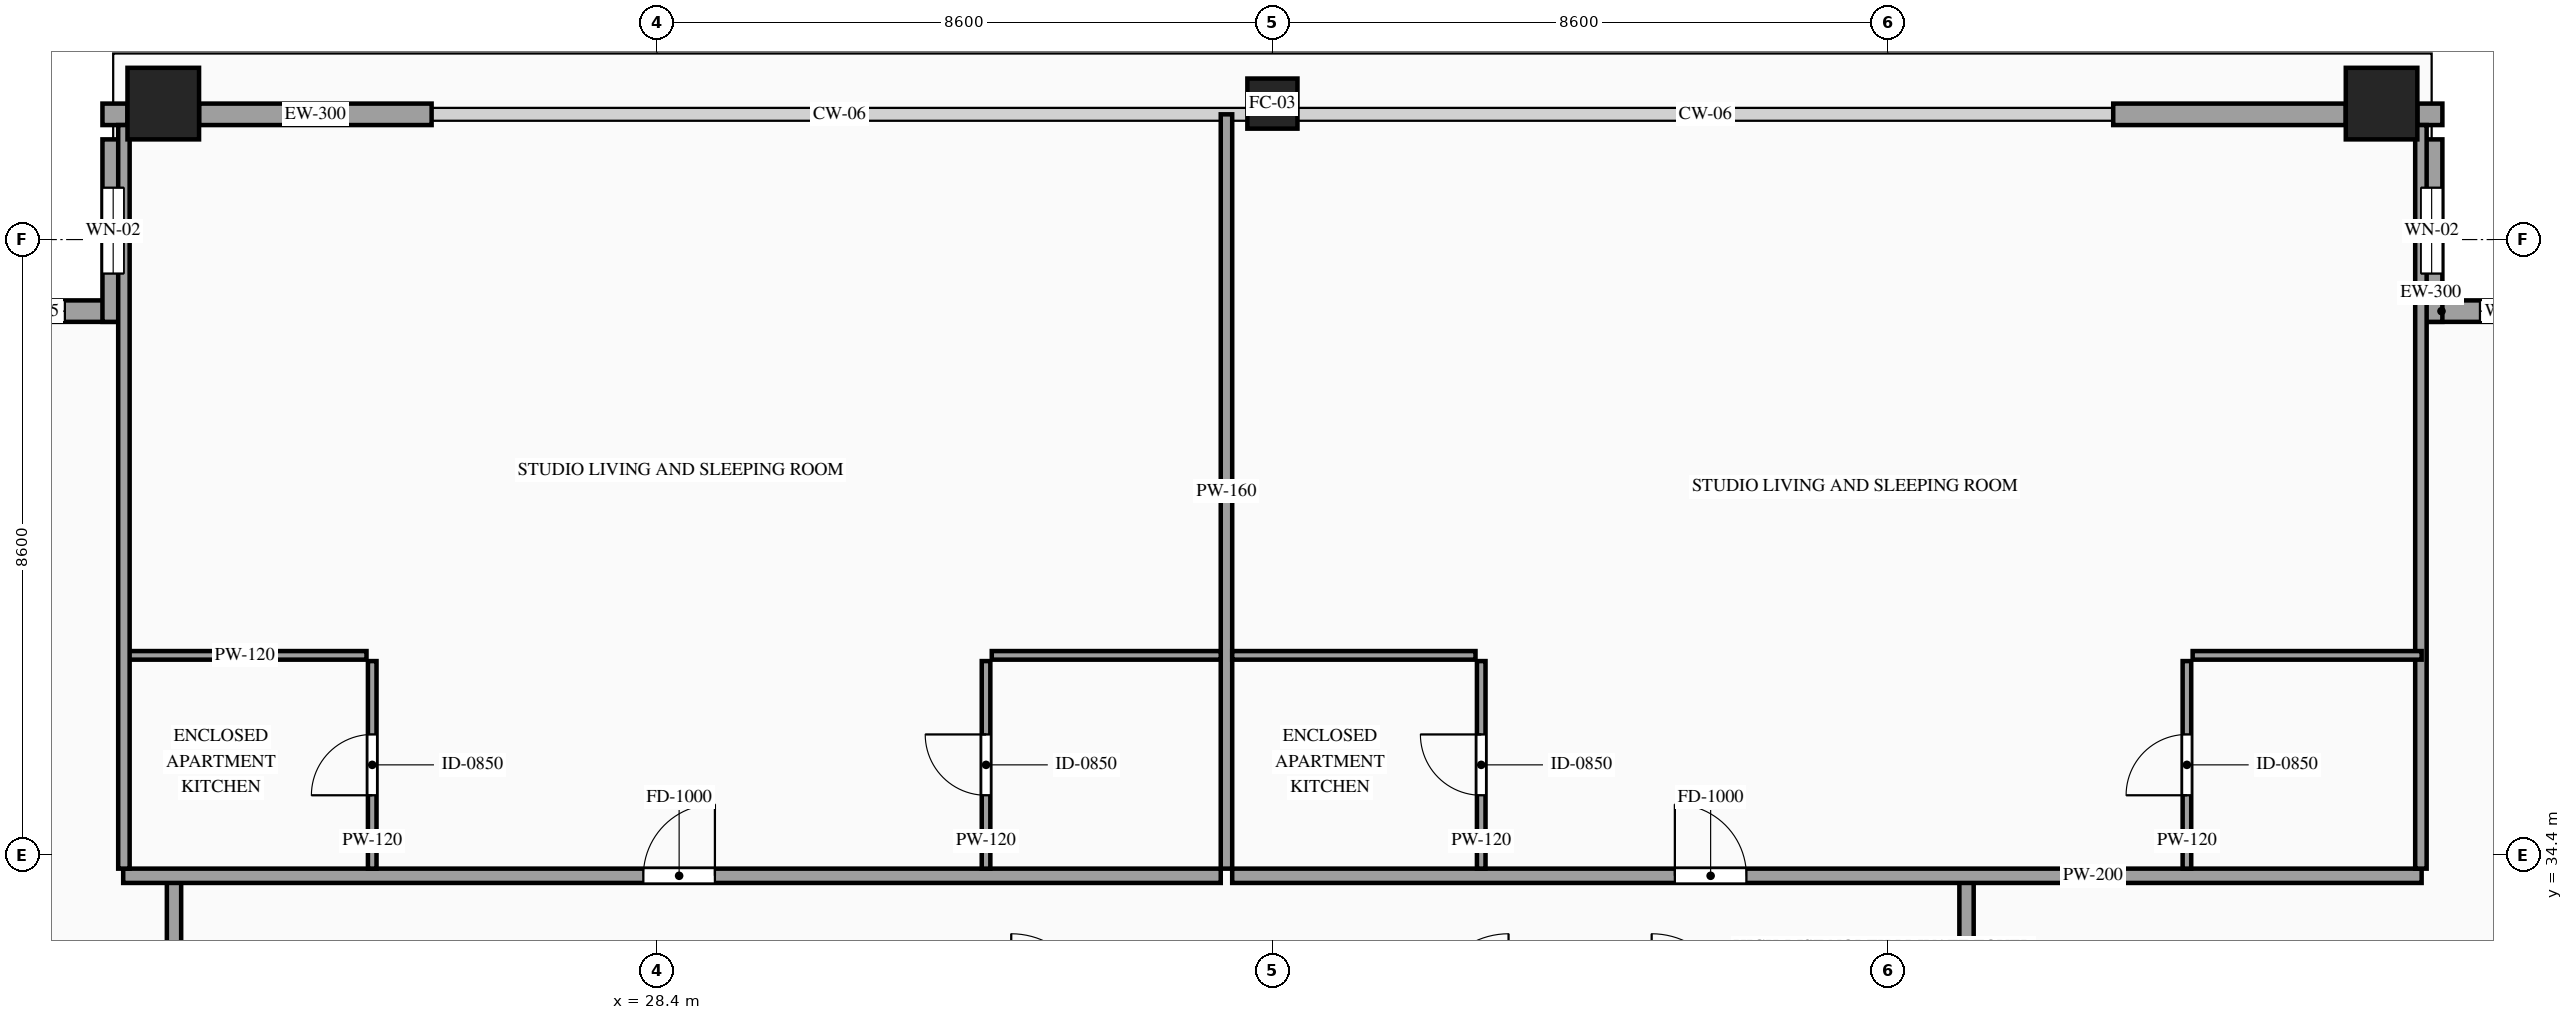
"""IFC4 building model, lengths in metres.
Left out: names, types, materials, properties, quantities, classifications, styles, units other than length and angle.
Written with IfcOpenShell. Run it as: python <this file> out.ifc"""

import sys

from ifc_helpers import new_model, si_unit, direction, frame, frame_2d, origin, origin_2d, place, context, subcontext, project, spatial, rectangle, hollow_rectangle, extrude, source, transform, mapped, element, fill, save


model = new_model("IFC4")
c1 = context("Model", 3, precision=1e-05, world=origin(), true_north=direction((0.0, 1.0)))
c2 = subcontext(c1, "Body", "Model", "MODEL_VIEW")
j1 = project(units=[si_unit("LENGTHUNIT", "METRE"), si_unit("PLANEANGLEUNIT", "RADIAN")], contexts=[c1])
p1 = place(None, origin())
s1 = spatial("IfcSite", under=j1, at=p1, CompositionType="ELEMENT")
p2 = place(p1, origin())
s2 = spatial("IfcBuilding", under=s1, at=p2, CompositionType="ELEMENT")
p3 = place(p2, frame((0.0, 0.0, 328.7)))
s3 = spatial("IfcBuildingStorey", under=s2, at=p3, CompositionType="ELEMENT", Elevation=328.7)
m1 = source(origin(), c2, "Body", "SweptSolid", [
    extrude(hollow_rectangle(XDim=1.0, YDim=1.0, WallThickness=0.048, at=origin_2d()), origin(), (0.0, 0.0, 1.0), 3.5),
])
p4 = place(p3, frame((21.5, 44.9, 0.0), z_axis=(0.0, 0.0, 1.0), x_axis=(1.0, 0.0, 0.0)))
e1 = element("IfcColumn", 1, at=p4, inside=s3, PredefinedType="COLUMN", context=c2, shape_type="MappedRepresentation", body=[
    mapped(m1, transform((0.0, 0.0, 0.0), scale=1.0)),
])
m2 = source(origin(), c2, "Body", "SweptSolid", [
    extrude(hollow_rectangle(XDim=0.7, YDim=0.7, WallThickness=0.032, at=origin_2d()), origin(), (0.0, 0.0, 1.0), 3.5),
])
p5 = place(p3, frame((37.0, 44.9, 0.0), z_axis=(0.0, 0.0, 1.0), x_axis=(1.0, 0.0, 0.0)))
e2 = element("IfcColumn", 2, at=p5, inside=s3, PredefinedType="COLUMN", context=c2, shape_type="MappedRepresentation", body=[
    mapped(m2, transform((0.0, 0.0, 0.0), scale=1.0)),
])
p6 = place(p3, frame((52.5, 44.9, 0.0), z_axis=(0.0, 0.0, 1.0), x_axis=(1.0, 0.0, 0.0)))
e3 = element("IfcColumn", 3, at=p6, inside=s3, PredefinedType="COLUMN", context=c2, shape_type="MappedRepresentation", body=[
    mapped(m1, transform((0.0, 0.0, 0.0), scale=1.0)),
])
p7 = place(p3, frame((20.95, 42.0, 0.0), z_axis=(0.0, 0.0, 1.0), x_axis=(-1.0, 0.0, 0.0)))
e4 = element("IfcWall", 4, at=p7, inside=s3, PredefinedType="SOLIDWALL", context=c2, shape_type="SweptSolid", body=[
    extrude(rectangle(XDim=2.55, YDim=0.3, at=frame_2d((1.275, 0.0))), origin(), (0.0, 0.0, 1.0), 3.28),
])
p8 = place(p7, frame((0.825, 0.0, 0.85)))
e5 = element("IfcOpeningElement", 5, at=p8, cuts=e4, PredefinedType="OPENING", context=c2, shape_type="SweptSolid", body=[
    extrude(rectangle(XDim=0.9, YDim=1.5, at=frame_2d((0.45, 0.75))), frame((0.0, 0.165, 0.0), z_axis=(0.0, -1.0, 0.0), x_axis=(1.0, 0.0, 0.0)), (0.0, 0.0, 1.0), 0.33),
])
p9 = place(p3, frame((20.8, 44.4, 0.0), z_axis=(0.0, 0.0, 1.0), x_axis=(0.0, -1.0, 0.0)))
e6 = element("IfcWall", 6, at=p9, inside=s3, PredefinedType="SOLIDWALL", context=c2, shape_type="SweptSolid", body=[
    extrude(rectangle(XDim=2.55, YDim=0.3, at=frame_2d((1.275, 0.0))), origin(), (0.0, 0.0, 1.0), 3.28),
])
p10 = place(p9, frame((0.675, 0.0, 0.85)))
e7 = element("IfcOpeningElement", 7, at=p10, cuts=e6, PredefinedType="OPENING", context=c2, shape_type="SweptSolid", body=[
    extrude(rectangle(XDim=1.2, YDim=2.1, at=frame_2d((0.6, 1.05))), frame((0.0, 0.165, 0.0), z_axis=(0.0, -1.0, 0.0), x_axis=(1.0, 0.0, 0.0)), (0.0, 0.0, 1.0), 0.33),
])
p11 = place(p3, frame((55.6, 42.0, 0.0), z_axis=(0.0, 0.0, 1.0), x_axis=(-1.0, 0.0, 0.0)))
e8 = element("IfcWall", 8, at=p11, inside=s3, PredefinedType="SOLIDWALL", context=c2, shape_type="SweptSolid", body=[
    extrude(rectangle(XDim=2.55, YDim=0.3, at=frame_2d((1.275, 0.0))), origin(), (0.0, 0.0, 1.0), 3.28),
])
p12 = place(p11, frame((0.825, 0.0, 0.85)))
e9 = element("IfcOpeningElement", 9, at=p12, cuts=e8, PredefinedType="OPENING", context=c2, shape_type="SweptSolid", body=[
    extrude(rectangle(XDim=0.9, YDim=1.5, at=frame_2d((0.45, 0.75))), frame((0.0, 0.165, 0.0), z_axis=(0.0, -1.0, 0.0), x_axis=(1.0, 0.0, 0.0)), (0.0, 0.0, 1.0), 0.33),
])
p13 = place(p3, frame((53.2, 41.85, 0.0), z_axis=(0.0, 0.0, 1.0), x_axis=(0.0, 1.0, 0.0)))
e10 = element("IfcWall", 10, at=p13, inside=s3, PredefinedType="SOLIDWALL", context=c2, shape_type="SweptSolid", body=[
    extrude(rectangle(XDim=2.55, YDim=0.3, at=frame_2d((1.275, 0.0))), origin(), (0.0, 0.0, 1.0), 3.28),
])
p14 = place(p13, frame((0.675, 0.0, 0.85)))
e11 = element("IfcOpeningElement", 11, at=p14, cuts=e10, PredefinedType="OPENING", context=c2, shape_type="SweptSolid", body=[
    extrude(rectangle(XDim=1.2, YDim=2.1, at=frame_2d((0.6, 1.05))), frame((0.0, 0.165, 0.0), z_axis=(0.0, -1.0, 0.0), x_axis=(1.0, 0.0, 0.0)), (0.0, 0.0, 1.0), 0.33),
])
m3 = source(origin(), c2, "Body", "SweptSolid", [
    extrude(rectangle(XDim=0.35, YDim=0.3, at=frame_2d((0.175, 0.0))), origin(), (0.0, 0.0, 1.0), 3.28),
])
for number, where, z_axis, x_axis in (
    (12, (20.65, 44.75, 0.0), (0.0, 0.0, 1.0), (1.0, 0.0, 0.0)),
    (13, (53.0, 44.75, 0.0), (0.0, 0.0, 1.0), (1.0, 0.0, 0.0)),
):
    element("IfcWall", number, at=place(p3, frame(where, z_axis=z_axis, x_axis=x_axis)), inside=s3, PredefinedType="SOLIDWALL", context=c2, shape_type="MappedRepresentation", body=[
        mapped(m3, transform((0.0, 0.0, 0.0), scale=1.0)),
    ])
m4 = source(origin(), c2, "Body", "SweptSolid", [
    extrude(rectangle(XDim=3.25, YDim=0.3, at=frame_2d((1.625, 0.0))), origin(), (0.0, 0.0, 1.0), 2.885),
])
for number, where, z_axis, x_axis in (
    (14, (22.0, 44.75, 0.0), (0.0, 0.0, 1.0), (1.0, 0.0, 0.0)),
    (15, (48.75, 44.75, 0.0), (0.0, 0.0, 1.0), (1.0, 0.0, 0.0)),
):
    element("IfcWall", number, at=place(p3, frame(where, z_axis=z_axis, x_axis=x_axis)), inside=s3, PredefinedType="SOLIDWALL", context=c2, shape_type="MappedRepresentation", body=[
        mapped(m4, transform((0.0, 0.0, 0.0), scale=1.0)),
    ])
m5 = source(origin(), c2, "Body", "SweptSolid", [
    extrude(rectangle(XDim=1.7, YDim=0.2, at=frame_2d((0.85, 0.0))), origin(), (0.0, 0.0, 1.0), 3.28),
])
for number, where, z_axis, x_axis in (
    (16, (21.65, 32.35, 0.0), (0.0, 0.0, 1.0), (0.0, 1.0, 0.0)),
    (17, (46.7, 32.35, 0.0), (0.0, 0.0, 1.0), (0.0, 1.0, 0.0)),
):
    element("IfcWall", number, at=place(p3, frame(where, z_axis=z_axis, x_axis=x_axis)), inside=s3, PredefinedType="PARTITIONING", context=c2, shape_type="MappedRepresentation", body=[
        mapped(m5, transform((0.0, 0.0, 0.0), scale=1.0)),
    ])
p15 = place(p3, frame((20.94, 34.11, 0.0), z_axis=(0.0, 0.0, 1.0), x_axis=(1.0, 0.0, 0.0)))
e18 = element("IfcWall", 18, at=p15, inside=s3, PredefinedType="PARTITIONING", context=c2, shape_type="SweptSolid", body=[
    extrude(rectangle(XDim=15.338, YDim=0.2, at=frame_2d((7.669, 0.0))), origin(), (0.0, 0.0, 1.0), 3.28),
])
p16 = place(p15, frame((7.269, 0.0, 0.0)))
e19 = element("IfcOpeningElement", 19, at=p16, cuts=e18, PredefinedType="OPENING", context=c2, shape_type="SweptSolid", body=[
    extrude(rectangle(XDim=1.0, YDim=2.2, at=frame_2d((0.5, 1.1))), frame((0.0, 0.115, 0.0), z_axis=(0.0, -1.0, 0.0), x_axis=(1.0, 0.0, 0.0)), (0.0, 0.0, 1.0), 0.23),
])
m6 = source(origin(), c2, "Body", "SweptSolid", [
    extrude(rectangle(XDim=10.54, YDim=0.16, at=frame_2d((5.27, 0.0))), origin(), (0.0, 0.0, 1.0), 3.28),
])
p17 = place(p3, frame((36.358, 34.21, 0.0), z_axis=(0.0, 0.0, 1.0), x_axis=(0.0, 1.0, 0.0)))
e20 = element("IfcWall", 20, at=p17, inside=s3, PredefinedType="PARTITIONING", context=c2, shape_type="MappedRepresentation", body=[
    mapped(m6, transform((0.0, 0.0, 0.0), scale=1.0)),
])
m7 = source(origin(), c2, "Body", "SweptSolid", [
    extrude(rectangle(XDim=3.4, YDim=0.12, at=frame_2d((1.7, 0.0))), origin(), (0.0, 0.0, 1.0), 3.28),
])
p18 = place(p3, frame((20.94, 37.19, 0.0), z_axis=(0.0, 0.0, 1.0), x_axis=(1.0, 0.0, 0.0)))
e21 = element("IfcWall", 21, at=p18, inside=s3, PredefinedType="PARTITIONING", context=c2, shape_type="MappedRepresentation", body=[
    mapped(m7, transform((0.0, 0.0, 0.0), scale=1.0)),
])
p19 = place(p3, frame((24.42, 34.21, 0.0), z_axis=(0.0, 0.0, 1.0), x_axis=(0.0, 1.0, 0.0)))
e22 = element("IfcWall", 22, at=p19, inside=s3, PredefinedType="PARTITIONING", context=c2, shape_type="SweptSolid", body=[
    extrude(rectangle(XDim=2.9, YDim=0.12, at=frame_2d((1.45, 0.0))), origin(), (0.0, 0.0, 1.0), 3.28),
])
p20 = place(p19, frame((1.025, 0.0, 0.0)))
e23 = element("IfcOpeningElement", 23, at=p20, cuts=e22, PredefinedType="OPENING", context=c2, shape_type="SweptSolid", body=[
    extrude(rectangle(XDim=0.85, YDim=2.1, at=frame_2d((0.425, 1.05))), frame((0.0, 0.075, 0.0), z_axis=(0.0, -1.0, 0.0), x_axis=(1.0, 0.0, 0.0)), (0.0, 0.0, 1.0), 0.15),
])
m8 = source(origin(), c2, "Body", "SweptSolid", [
    extrude(rectangle(XDim=3.2, YDim=0.12, at=frame_2d((1.6, 0.0))), origin(), (0.0, 0.0, 1.0), 3.28),
])
p21 = place(p3, frame((33.078, 37.19, 0.0), z_axis=(0.0, 0.0, 1.0), x_axis=(1.0, 0.0, 0.0)))
e24 = element("IfcWall", 24, at=p21, inside=s3, PredefinedType="PARTITIONING", context=c2, shape_type="MappedRepresentation", body=[
    mapped(m8, transform((0.0, 0.0, 0.0), scale=1.0)),
])
p22 = place(p3, frame((32.998, 34.21, 0.0), z_axis=(0.0, 0.0, 1.0), x_axis=(0.0, 1.0, 0.0)))
e25 = element("IfcWall", 25, at=p22, inside=s3, PredefinedType="PARTITIONING", context=c2, shape_type="SweptSolid", body=[
    extrude(rectangle(XDim=2.9, YDim=0.12, at=frame_2d((1.45, 0.0))), origin(), (0.0, 0.0, 1.0), 3.28),
])
p23 = place(p22, frame((1.025, 0.0, 0.0)))
e26 = element("IfcOpeningElement", 26, at=p23, cuts=e25, PredefinedType="OPENING", context=c2, shape_type="SweptSolid", body=[
    extrude(rectangle(XDim=0.85, YDim=2.1, at=frame_2d((0.425, 1.05))), frame((0.0, 0.075, 0.0), z_axis=(0.0, -1.0, 0.0), x_axis=(1.0, 0.0, 0.0)), (0.0, 0.0, 1.0), 0.15),
])
p24 = place(p3, frame((36.438, 34.11, 0.0), z_axis=(0.0, 0.0, 1.0), x_axis=(1.0, 0.0, 0.0)))
e27 = element("IfcWall", 27, at=p24, inside=s3, PredefinedType="PARTITIONING", context=c2, shape_type="SweptSolid", body=[
    extrude(rectangle(XDim=16.622, YDim=0.2, at=frame_2d((8.311, 0.0))), origin(), (0.0, 0.0, 1.0), 3.28),
])
p25 = place(p24, frame((6.186, 0.0, 0.0)))
e28 = element("IfcOpeningElement", 28, at=p25, cuts=e27, PredefinedType="OPENING", context=c2, shape_type="SweptSolid", body=[
    extrude(rectangle(XDim=1.0, YDim=2.2, at=frame_2d((0.5, 1.1))), frame((0.0, 0.115, 0.0), z_axis=(0.0, -1.0, 0.0), x_axis=(1.0, 0.0, 0.0)), (0.0, 0.0, 1.0), 0.23),
])
m9 = source(origin(), c2, "Body", "SweptSolid", [
    extrude(rectangle(XDim=10.39, YDim=0.16, at=frame_2d((5.195, 0.0))), origin(), (0.0, 0.0, 1.0), 3.28),
])
for number, where, z_axis, x_axis in (
    (29, (20.95, 34.21, 0.0), (0.0, 0.0, 1.0), (0.0, 1.0, 0.0)),
    (30, (53.05, 34.21, 0.0), (0.0, 0.0, 1.0), (0.0, 1.0, 0.0)),
):
    element("IfcWall", number, at=place(p3, frame(where, z_axis=z_axis, x_axis=x_axis)), inside=s3, PredefinedType="PARTITIONING", context=c2, shape_type="MappedRepresentation", body=[
        mapped(m9, transform((0.0, 0.0, 0.0), scale=1.0)),
    ])
m10 = source(origin(), c2, "Body", "SweptSolid", [
    extrude(rectangle(XDim=3.4, YDim=0.12, at=frame_2d((1.7, 0.0))), origin(), (0.0, 0.0, 1.0), 3.28),
])
p26 = place(p3, frame((36.438, 37.19, 0.0), z_axis=(0.0, 0.0, 1.0), x_axis=(1.0, 0.0, 0.0)))
e31 = element("IfcWall", 31, at=p26, inside=s3, PredefinedType="PARTITIONING", context=c2, shape_type="MappedRepresentation", body=[
    mapped(m10, transform((0.0, 0.0, 0.0), scale=1.0)),
])
p27 = place(p3, frame((39.918, 34.21, 0.0), z_axis=(0.0, 0.0, 1.0), x_axis=(0.0, 1.0, 0.0)))
e32 = element("IfcWall", 32, at=p27, inside=s3, PredefinedType="PARTITIONING", context=c2, shape_type="SweptSolid", body=[
    extrude(rectangle(XDim=2.9, YDim=0.12, at=frame_2d((1.45, 0.0))), origin(), (0.0, 0.0, 1.0), 3.28),
])
p28 = place(p27, frame((1.025, 0.0, 0.0)))
e33 = element("IfcOpeningElement", 33, at=p28, cuts=e32, PredefinedType="OPENING", context=c2, shape_type="SweptSolid", body=[
    extrude(rectangle(XDim=0.85, YDim=2.1, at=frame_2d((0.425, 1.05))), frame((0.0, 0.075, 0.0), z_axis=(0.0, -1.0, 0.0), x_axis=(1.0, 0.0, 0.0)), (0.0, 0.0, 1.0), 0.15),
])
m11 = source(origin(), c2, "Body", "SweptSolid", [
    extrude(rectangle(XDim=3.2, YDim=0.12, at=frame_2d((1.6, 0.0))), origin(), (0.0, 0.0, 1.0), 3.28),
])
p29 = place(p3, frame((49.86, 37.19, 0.0), z_axis=(0.0, 0.0, 1.0), x_axis=(1.0, 0.0, 0.0)))
e34 = element("IfcWall", 34, at=p29, inside=s3, PredefinedType="PARTITIONING", context=c2, shape_type="MappedRepresentation", body=[
    mapped(m11, transform((0.0, 0.0, 0.0), scale=1.0)),
])
p30 = place(p3, frame((49.78, 34.21, 0.0), z_axis=(0.0, 0.0, 1.0), x_axis=(0.0, 1.0, 0.0)))
e35 = element("IfcWall", 35, at=p30, inside=s3, PredefinedType="PARTITIONING", context=c2, shape_type="SweptSolid", body=[
    extrude(rectangle(XDim=2.9, YDim=0.12, at=frame_2d((1.45, 0.0))), origin(), (0.0, 0.0, 1.0), 3.28),
])
p31 = place(p30, frame((1.025, 0.0, 0.0)))
e36 = element("IfcOpeningElement", 36, at=p31, cuts=e35, PredefinedType="OPENING", context=c2, shape_type="SweptSolid", body=[
    extrude(rectangle(XDim=0.85, YDim=2.1, at=frame_2d((0.425, 1.05))), frame((0.0, 0.075, 0.0), z_axis=(0.0, -1.0, 0.0), x_axis=(1.0, 0.0, 0.0)), (0.0, 0.0, 1.0), 0.15),
])
m12 = source(origin(), c2, "Body", "SweptSolid", [
    extrude(rectangle(XDim=0.9, YDim=1.5, at=frame_2d((0.45, 0.75))), frame((0.0, 0.03, 0.0), z_axis=(0.0, -1.0, 0.0), x_axis=(1.0, 0.0, 0.0)), (0.0, 0.0, 1.0), 0.06),
])
p32 = place(p8, origin())
e37 = element("IfcWindow", 37, at=p32, inside=s3, PartitioningType="SINGLE_PANEL", PredefinedType="WINDOW", context=c2, shape_type="MappedRepresentation", body=[
    mapped(m12, transform((0.0, 0.0, 0.0), scale=1.0)),
])
fill(e5, e37)
m13 = source(origin(), c2, "Body", "SweptSolid", [
    extrude(rectangle(XDim=1.2, YDim=2.1, at=frame_2d((0.6, 1.05))), frame((0.0, 0.03, 0.0), z_axis=(0.0, -1.0, 0.0), x_axis=(1.0, 0.0, 0.0)), (0.0, 0.0, 1.0), 0.06),
])
p33 = place(p10, origin())
e38 = element("IfcWindow", 38, at=p33, inside=s3, PartitioningType="SINGLE_PANEL", PredefinedType="WINDOW", context=c2, shape_type="MappedRepresentation", body=[
    mapped(m13, transform((0.0, 0.0, 0.0), scale=1.0)),
])
fill(e7, e38)
p34 = place(p12, origin())
e39 = element("IfcWindow", 39, at=p34, inside=s3, PartitioningType="SINGLE_PANEL", PredefinedType="WINDOW", context=c2, shape_type="MappedRepresentation", body=[
    mapped(m12, transform((0.0, 0.0, 0.0), scale=1.0)),
])
fill(e9, e39)
p35 = place(p14, origin())
e40 = element("IfcWindow", 40, at=p35, inside=s3, PartitioningType="SINGLE_PANEL", PredefinedType="WINDOW", context=c2, shape_type="MappedRepresentation", body=[
    mapped(m13, transform((0.0, 0.0, 0.0), scale=1.0)),
])
fill(e11, e40)
m14 = source(origin(), c2, "Body", "SweptSolid", [
    extrude(rectangle(XDim=1.0, YDim=2.2, at=frame_2d((0.5, 1.1))), frame((0.0, 0.025, 0.0), z_axis=(0.0, -1.0, 0.0), x_axis=(1.0, 0.0, 0.0)), (0.0, 0.0, 1.0), 0.05),
])
p36 = place(p16, origin())
e41 = element("IfcDoor", 41, at=p36, inside=s3, OperationType="SINGLE_SWING_RIGHT", PredefinedType="DOOR", context=c2, shape_type="MappedRepresentation", body=[
    mapped(m14, transform((0.0, 0.0, 0.0), scale=1.0)),
])
fill(e19, e41)
m15 = source(origin(), c2, "Body", "SweptSolid", [
    extrude(rectangle(XDim=0.85, YDim=2.1, at=frame_2d((0.425, 1.05))), frame((0.0, 0.025, 0.0), z_axis=(0.0, -1.0, 0.0), x_axis=(1.0, 0.0, 0.0)), (0.0, 0.0, 1.0), 0.05),
])
p37 = place(p20, origin())
e42 = element("IfcDoor", 42, at=p37, inside=s3, OperationType="SINGLE_SWING_LEFT", PredefinedType="DOOR", context=c2, shape_type="MappedRepresentation", body=[
    mapped(m15, transform((0.0, 0.0, 0.0), scale=1.0)),
])
fill(e23, e42)
p38 = place(p23, origin())
e43 = element("IfcDoor", 43, at=p38, inside=s3, OperationType="SINGLE_SWING_RIGHT", PredefinedType="DOOR", context=c2, shape_type="MappedRepresentation", body=[
    mapped(m15, transform((0.0, 0.0, 0.0), scale=1.0)),
])
fill(e26, e43)
p39 = place(p25, origin())
e44 = element("IfcDoor", 44, at=p39, inside=s3, OperationType="SINGLE_SWING_LEFT", PredefinedType="DOOR", context=c2, shape_type="MappedRepresentation", body=[
    mapped(m14, transform((0.0, 0.0, 0.0), scale=1.0)),
])
fill(e28, e44)
p40 = place(p28, origin())
e45 = element("IfcDoor", 45, at=p40, inside=s3, OperationType="SINGLE_SWING_RIGHT", PredefinedType="DOOR", context=c2, shape_type="MappedRepresentation", body=[
    mapped(m15, transform((0.0, 0.0, 0.0), scale=1.0)),
])
fill(e33, e45)
p41 = place(p31, origin())
e46 = element("IfcDoor", 46, at=p41, inside=s3, OperationType="SINGLE_SWING_LEFT", PredefinedType="DOOR", context=c2, shape_type="MappedRepresentation", body=[
    mapped(m15, transform((0.0, 0.0, 0.0), scale=1.0)),
])
fill(e36, e46)
save(model, sys.argv[1])
